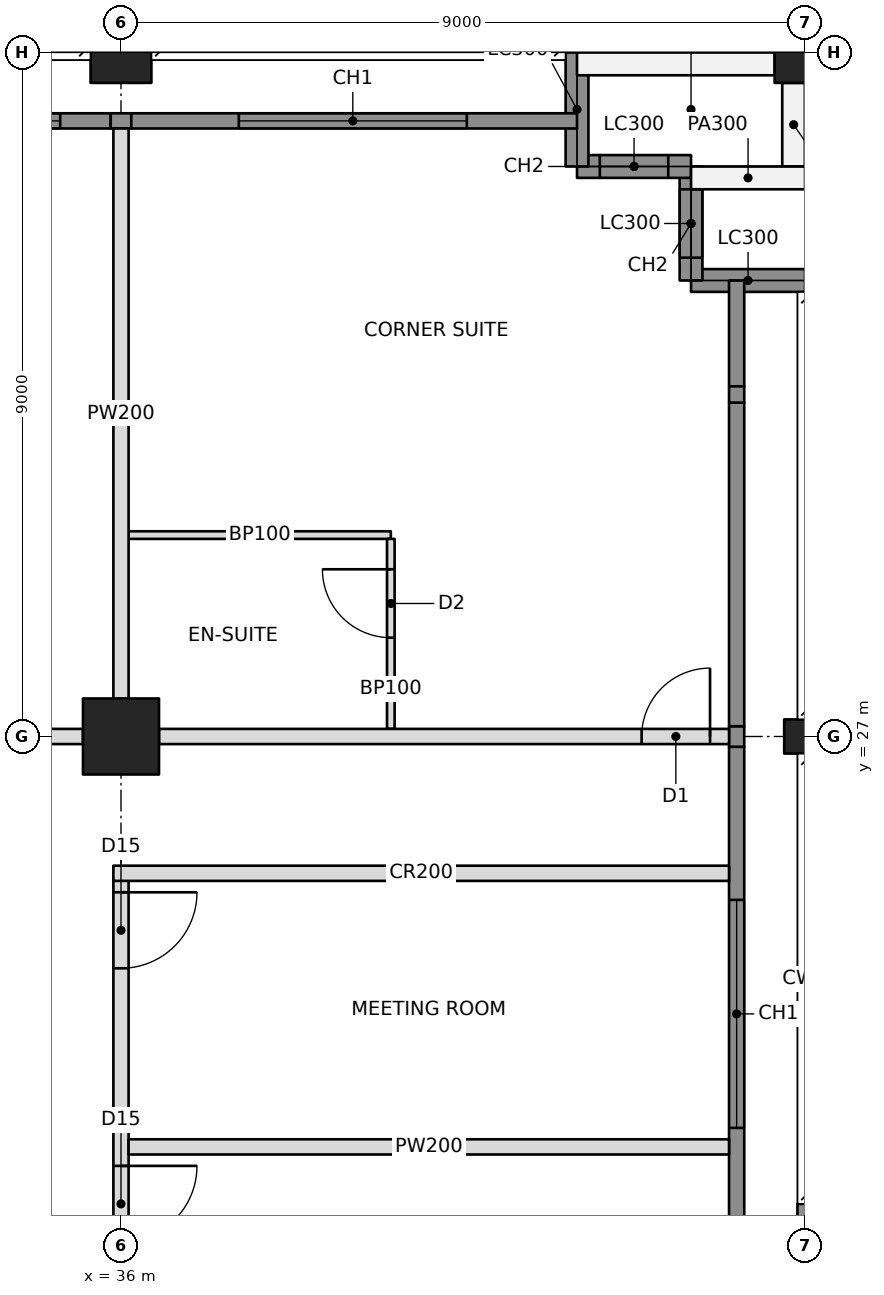
"""IFC4 building model, lengths in metres.
Left out: names, types, materials, properties, quantities, classifications, styles, units other than length and angle.
Written with IfcOpenShell. Run it as: python <this file> out.ifc"""

import sys

from ifc_helpers import new_model, si_unit, direction, frame, frame_2d, origin, origin_2d, place, context, subcontext, project, spatial, rectangle, hollow_rectangle, i_section, extrude, element, fill, save


model = new_model("IFC4")
c1 = context("Model", 3, precision=1e-05, world=origin(), true_north=direction((0.0, 1.0)))
c2 = subcontext(c1, "Body", "Model", "MODEL_VIEW")
j1 = project(units=[si_unit("LENGTHUNIT", "METRE"), si_unit("PLANEANGLEUNIT", "RADIAN")], contexts=[c1])
p1 = place(None, origin())
s1 = spatial("IfcSite", under=j1, at=p1, CompositionType="ELEMENT")
p2 = place(p1, origin())
s2 = spatial("IfcBuilding", under=s1, at=p2, CompositionType="ELEMENT")
p3 = place(p2, frame((0.0, 0.0, 94.2)))
s3 = spatial("IfcBuildingStorey", under=s2, at=p3, CompositionType="ELEMENT", Elevation=94.2)
p4 = place(p3, frame((36.0, 27.0, 0.0), z_axis=(0.0, 0.0, 1.0), x_axis=(1.0, 0.0, 0.0)))
e1 = element("IfcColumn", 1, at=p4, inside=s3, PredefinedType="COLUMN", context=c2, shape_type="SweptSolid", body=[
    extrude(hollow_rectangle(XDim=1.0, YDim=1.0, WallThickness=0.1, at=origin_2d()), origin(), (0.0, 0.0, 1.0), 3.4),
])
p5 = place(p3, frame((36.0, 36.0, 0.0), z_axis=(0.0, 0.0, 1.0), x_axis=(1.0, 0.0, 0.0)))
e2 = element("IfcColumn", 2, at=p5, inside=s3, PredefinedType="COLUMN", context=c2, shape_type="SweptSolid", body=[
    extrude(hollow_rectangle(XDim=0.8, YDim=0.8, WallThickness=0.07, at=origin_2d()), origin(), (0.0, 0.0, 1.0), 3.4),
])
p6 = place(p3, frame((45.0, 27.0, 0.0), z_axis=(0.0, 0.0, 1.0), x_axis=(0.0, 1.0, 0.0)))
e3 = element("IfcColumn", 3, at=p6, inside=s3, PredefinedType="COLUMN", context=c2, shape_type="SweptSolid", body=[
    extrude(i_section(OverallWidth=0.449, OverallDepth=0.549, WebThickness=0.072, FlangeThickness=0.115, at=origin_2d()), origin(), (0.0, 0.0, 1.0), 3.4),
])
p7 = place(p3, frame((45.0, 36.0, 0.0), z_axis=(0.0, 0.0, 1.0), x_axis=(1.0, 0.0, 0.0)))
e4 = element("IfcColumn", 4, at=p7, inside=s3, PredefinedType="COLUMN", context=c2, shape_type="SweptSolid", body=[
    extrude(hollow_rectangle(XDim=0.8, YDim=0.8, WallThickness=0.07, at=origin_2d()), origin(), (0.0, 0.0, 1.0), 3.4),
])
p8 = place(p3, frame((45.0, 33.0, 0.0), z_axis=(0.0, 0.0, 1.0), x_axis=(-1.0, 0.0, 0.0)))
e5 = element("IfcWall", 5, at=p8, inside=s3, PredefinedType="SOLIDWALL", context=c2, shape_type="SweptSolid", body=[
    extrude(rectangle(XDim=1.5, YDim=0.3, at=frame_2d((0.75, 0.0))), origin(), (0.0, 0.0, 1.0), 2.42),
])
p9 = place(p3, frame((43.5, 33.0, 0.0), z_axis=(0.0, 0.0, 1.0), x_axis=(0.0, 1.0, 0.0)))
e6 = element("IfcWall", 6, at=p9, inside=s3, PredefinedType="SOLIDWALL", context=c2, shape_type="SweptSolid", body=[
    extrude(rectangle(XDim=1.5, YDim=0.3, at=frame_2d((0.75, 0.0))), origin(), (0.0, 0.0, 1.0), 3.2),
])
p10 = place(p9, frame((0.3, 0.0, 0.6)))
e7 = element("IfcOpeningElement", 7, at=p10, cuts=e6, PredefinedType="OPENING", context=c2, shape_type="SweptSolid", body=[
    extrude(rectangle(XDim=0.9, YDim=2.2, at=frame_2d((0.45, 1.1))), frame((0.0, 0.16, 0.0), z_axis=(0.0, -1.0, 0.0), x_axis=(1.0, 0.0, 0.0)), (0.0, 0.0, 1.0), 0.32),
])
p11 = place(p3, frame((43.5, 34.5, 0.0), z_axis=(0.0, 0.0, 1.0), x_axis=(-1.0, 0.0, 0.0)))
e8 = element("IfcWall", 8, at=p11, inside=s3, PredefinedType="SOLIDWALL", context=c2, shape_type="SweptSolid", body=[
    extrude(rectangle(XDim=1.5, YDim=0.3, at=frame_2d((0.75, 0.0))), origin(), (0.0, 0.0, 1.0), 3.2),
])
p12 = place(p11, frame((0.3, 0.0, 0.6)))
e9 = element("IfcOpeningElement", 9, at=p12, cuts=e8, PredefinedType="OPENING", context=c2, shape_type="SweptSolid", body=[
    extrude(rectangle(XDim=0.9, YDim=2.2, at=frame_2d((0.45, 1.1))), frame((0.0, 0.16, 0.0), z_axis=(0.0, -1.0, 0.0), x_axis=(1.0, 0.0, 0.0)), (0.0, 0.0, 1.0), 0.32),
])
p13 = place(p3, frame((42.0, 34.5, 0.0), z_axis=(0.0, 0.0, 1.0), x_axis=(0.0, 1.0, 0.0)))
e10 = element("IfcWall", 10, at=p13, inside=s3, PredefinedType="SOLIDWALL", context=c2, shape_type="SweptSolid", body=[
    extrude(rectangle(XDim=1.5, YDim=0.3, at=frame_2d((0.75, 0.0))), origin(), (0.0, 0.0, 1.0), 2.42),
])
p14 = place(p3, frame((45.0, 20.85, 0.0), z_axis=(0.0, 0.0, 1.0), x_axis=(0.0, -1.0, 0.0)))
e11 = element("IfcWall", 11, at=p14, inside=s3, PredefinedType="SOLIDWALL", context=c2, shape_type="SweptSolid", body=[
    extrude(rectangle(XDim=2.625, YDim=0.2, at=frame_2d((1.312, 0.0))), origin(), (0.0, 0.0, 1.0), 2.42),
])
p15 = place(p14, frame((0.5, 0.0, 0.0)))
e12 = element("IfcOpeningElement", 12, at=p15, cuts=e11, PredefinedType="OPENING", context=c2, shape_type="SweptSolid", body=[
    extrude(rectangle(XDim=1.0, YDim=2.1, at=frame_2d((0.5, 1.05))), frame((0.0, 0.11, 0.0), z_axis=(0.0, -1.0, 0.0), x_axis=(1.0, 0.0, 0.0)), (0.0, 0.0, 1.0), 0.22),
])
p16 = place(p3, frame((42.0, 35.85, 0.0), z_axis=(0.0, 0.0, 1.0), x_axis=(1.0, 0.0, 0.0)))
e13 = element("IfcWall", 13, at=p16, inside=s3, PredefinedType="PARAPET", context=c2, shape_type="SweptSolid", body=[
    extrude(rectangle(XDim=2.6, YDim=0.3, at=frame_2d((1.3, 0.0))), origin(), (0.0, 0.0, 1.0), 1.1),
])
p17 = place(p3, frame((44.85, 35.6, 0.0), z_axis=(0.0, 0.0, 1.0), x_axis=(0.0, -1.0, 0.0)))
e14 = element("IfcWall", 14, at=p17, inside=s3, PredefinedType="PARAPET", context=c2, shape_type="SweptSolid", body=[
    extrude(rectangle(XDim=1.1, YDim=0.3, at=frame_2d((0.55, 0.0))), origin(), (0.0, 0.0, 1.0), 1.1),
])
p18 = place(p3, frame((43.5, 34.35, 0.0), z_axis=(0.0, 0.0, 1.0), x_axis=(1.0, 0.0, 0.0)))
e15 = element("IfcWall", 15, at=p18, inside=s3, PredefinedType="PARAPET", context=c2, shape_type="SweptSolid", body=[
    extrude(rectangle(XDim=1.5, YDim=0.3, at=frame_2d((0.75, 0.0))), origin(), (0.0, 0.0, 1.0), 1.1),
])
p19 = place(p3, frame((45.15, 34.5, 0.0), z_axis=(0.0, 0.0, 1.0), x_axis=(0.0, 1.0, 0.0)))
e16 = element("IfcWall", 16, at=p19, inside=s3, PredefinedType="PARAPET", context=c2, shape_type="SweptSolid", body=[
    extrude(rectangle(XDim=1.1, YDim=0.3, at=frame_2d((0.55, 0.0))), origin(), (0.0, 0.0, 1.0), 1.1),
])
p20 = place(p3, frame((27.5, 27.0, 0.0), z_axis=(0.0, 0.0, 1.0), x_axis=(1.0, 0.0, 0.0)))
e17 = element("IfcWall", 17, at=p20, inside=s3, PredefinedType="PARTITIONING", context=c2, shape_type="SweptSolid", body=[
    extrude(rectangle(XDim=8.0, YDim=0.2, at=frame_2d((4.0, 0.0))), origin(), (0.0, 0.0, 1.0), 2.405),
])
p21 = place(p3, frame((36.5, 27.0, 0.0), z_axis=(0.0, 0.0, 1.0), x_axis=(1.0, 0.0, 0.0)))
e18 = element("IfcWall", 18, at=p21, inside=s3, PredefinedType="PARTITIONING", context=c2, shape_type="SweptSolid", body=[
    extrude(rectangle(XDim=7.5, YDim=0.2, at=frame_2d((3.75, 0.0))), origin(), (0.0, 0.0, 1.0), 2.438),
])
p22 = place(p21, frame((6.35, 0.0, 0.0)))
e19 = element("IfcOpeningElement", 19, at=p22, cuts=e18, PredefinedType="OPENING", context=c2, shape_type="SweptSolid", body=[
    extrude(rectangle(XDim=0.9, YDim=2.1, at=frame_2d((0.45, 1.05))), frame((0.0, 0.11, 0.0), z_axis=(0.0, -1.0, 0.0), x_axis=(1.0, 0.0, 0.0)), (0.0, 0.0, 1.0), 0.22),
])
p23 = place(p3, frame((36.0, 18.5, 0.0), z_axis=(0.0, 0.0, 1.0), x_axis=(0.0, 1.0, 0.0)))
e20 = element("IfcWall", 20, at=p23, inside=s3, PredefinedType="PARTITIONING", context=c2, shape_type="SweptSolid", body=[
    extrude(rectangle(XDim=6.7, YDim=0.2, at=frame_2d((3.35, 0.0))), origin(), (0.0, 0.0, 1.0), 2.405),
])
p24 = place(p23, frame((5.45, 0.0, 0.0)))
e21 = element("IfcOpeningElement", 21, at=p24, cuts=e20, PredefinedType="OPENING", context=c2, shape_type="SweptSolid", body=[
    extrude(rectangle(XDim=1.0, YDim=2.1, at=frame_2d((0.5, 1.05))), frame((0.0, 0.11, 0.0), z_axis=(0.0, -1.0, 0.0), x_axis=(1.0, 0.0, 0.0)), (0.0, 0.0, 1.0), 0.22),
])
p25 = place(p23, frame((1.85, 0.0, 0.0)))
e22 = element("IfcOpeningElement", 22, at=p25, cuts=e20, PredefinedType="OPENING", context=c2, shape_type="SweptSolid", body=[
    extrude(rectangle(XDim=1.0, YDim=2.1, at=frame_2d((0.5, 1.05))), frame((0.0, 0.11, 0.0), z_axis=(0.0, -1.0, 0.0), x_axis=(1.0, 0.0, 0.0)), (0.0, 0.0, 1.0), 0.22),
])
p26 = place(p3, frame((35.9, 25.2, 0.0), z_axis=(0.0, 0.0, 1.0), x_axis=(1.0, 0.0, 0.0)))
e23 = element("IfcWall", 23, at=p26, inside=s3, PredefinedType="PARTITIONING", context=c2, shape_type="SweptSolid", body=[
    extrude(rectangle(XDim=8.1, YDim=0.2, at=frame_2d((4.05, 0.0))), origin(), (0.0, 0.0, 1.0), 2.404),
])
p27 = place(p3, frame((36.0, 27.5, 0.0), z_axis=(0.0, 0.0, 1.0), x_axis=(0.0, 1.0, 0.0)))
e24 = element("IfcWall", 24, at=p27, inside=s3, PredefinedType="PARTITIONING", context=c2, shape_type="SweptSolid", body=[
    extrude(rectangle(XDim=7.5, YDim=0.2, at=frame_2d((3.75, 0.0))), origin(), (0.0, 0.0, 1.0), 2.438),
])
p28 = place(p3, frame((36.1, 29.65, 0.0), z_axis=(0.0, 0.0, 1.0), x_axis=(1.0, 0.0, 0.0)))
e25 = element("IfcWall", 25, at=p28, inside=s3, PredefinedType="PARTITIONING", context=c2, shape_type="SweptSolid", body=[
    extrude(rectangle(XDim=3.45, YDim=0.1, at=frame_2d((1.725, 0.0))), origin(), (0.0, 0.0, 1.0), 2.438),
])
p29 = place(p3, frame((39.55, 27.1, 0.0), z_axis=(0.0, 0.0, 1.0), x_axis=(0.0, 1.0, 0.0)))
e26 = element("IfcWall", 26, at=p29, inside=s3, PredefinedType="PARTITIONING", context=c2, shape_type="SweptSolid", body=[
    extrude(rectangle(XDim=2.5, YDim=0.1, at=frame_2d((1.25, 0.0))), origin(), (0.0, 0.0, 1.0), 2.438),
])
p30 = place(p29, frame((1.2, 0.0, 0.0)))
e27 = element("IfcOpeningElement", 27, at=p30, cuts=e26, PredefinedType="OPENING", context=c2, shape_type="SweptSolid", body=[
    extrude(rectangle(XDim=0.9, YDim=2.1, at=frame_2d((0.45, 1.05))), frame((0.0, 0.06, 0.0), z_axis=(0.0, -1.0, 0.0), x_axis=(1.0, 0.0, 0.0)), (0.0, 0.0, 1.0), 0.12),
])
p31 = place(p3, frame((36.1, 21.6, 0.0), z_axis=(0.0, 0.0, 1.0), x_axis=(1.0, 0.0, 0.0)))
e28 = element("IfcWall", 28, at=p31, inside=s3, PredefinedType="PARTITIONING", context=c2, shape_type="SweptSolid", body=[
    extrude(rectangle(XDim=7.9, YDim=0.2, at=frame_2d((3.95, 0.0))), origin(), (0.0, 0.0, 1.0), 2.404),
])
p32 = place(p3, frame((27.194, 35.1, 0.0), z_axis=(0.0, 0.0, 1.0), x_axis=(1.0, 0.0, 0.0)))
e29 = element("IfcWall", 29, at=p32, inside=s3, PredefinedType="SOLIDWALL", context=c2, shape_type="SweptSolid", body=[
    extrude(rectangle(XDim=8.671, YDim=0.2, at=frame_2d((4.335, 0.0))), origin(), (0.0, 0.0, 1.0), 3.2),
])
p33 = place(p32, frame((0.606, 0.0, 0.6)))
e30 = element("IfcOpeningElement", 30, at=p33, cuts=e29, PredefinedType="OPENING", context=c2, shape_type="SweptSolid", body=[
    extrude(rectangle(XDim=3.0, YDim=2.2, at=frame_2d((1.5, 1.1))), frame((0.0, 0.11, 0.0), z_axis=(0.0, -1.0, 0.0), x_axis=(1.0, 0.0, 0.0)), (0.0, 0.0, 1.0), 0.22),
])
p34 = place(p32, frame((5.006, 0.0, 0.6)))
e31 = element("IfcOpeningElement", 31, at=p34, cuts=e29, PredefinedType="OPENING", context=c2, shape_type="SweptSolid", body=[
    extrude(rectangle(XDim=3.0, YDim=2.2, at=frame_2d((1.5, 1.1))), frame((0.0, 0.11, 0.0), z_axis=(0.0, -1.0, 0.0), x_axis=(1.0, 0.0, 0.0)), (0.0, 0.0, 1.0), 0.22),
])
p35 = place(p3, frame((35.865, 35.1, 0.0), z_axis=(0.0, 0.0, 1.0), x_axis=(1.0, 0.0, 0.0)))
e32 = element("IfcWall", 32, at=p35, inside=s3, PredefinedType="SOLIDWALL", context=c2, shape_type="SweptSolid", body=[
    extrude(rectangle(XDim=0.271, YDim=0.2, at=frame_2d((0.135, 0.0))), origin(), (0.0, 0.0, 1.0), 2.438),
])
p36 = place(p3, frame((36.135, 35.1, 0.0), z_axis=(0.0, 0.0, 1.0), x_axis=(1.0, 0.0, 0.0)))
e33 = element("IfcWall", 33, at=p36, inside=s3, PredefinedType="SOLIDWALL", context=c2, shape_type="SweptSolid", body=[
    extrude(rectangle(XDim=5.865, YDim=0.2, at=frame_2d((2.932, 0.0))), origin(), (0.0, 0.0, 1.0), 3.2),
])
p37 = place(p36, frame((1.415, 0.0, 0.6)))
e34 = element("IfcOpeningElement", 34, at=p37, cuts=e33, PredefinedType="OPENING", context=c2, shape_type="SweptSolid", body=[
    extrude(rectangle(XDim=3.0, YDim=2.2, at=frame_2d((1.5, 1.1))), frame((0.0, 0.11, 0.0), z_axis=(0.0, -1.0, 0.0), x_axis=(1.0, 0.0, 0.0)), (0.0, 0.0, 1.0), 0.22),
])
p38 = place(p3, frame((44.1, 18.194, 0.0), z_axis=(0.0, 0.0, 1.0), x_axis=(0.0, 1.0, 0.0)))
e35 = element("IfcWall", 35, at=p38, inside=s3, PredefinedType="SOLIDWALL", context=c2, shape_type="SweptSolid", body=[
    extrude(rectangle(XDim=8.671, YDim=0.2, at=frame_2d((4.335, 0.0))), origin(), (0.0, 0.0, 1.0), 3.2),
])
p39 = place(p38, frame((3.656, 0.0, 0.6)))
e36 = element("IfcOpeningElement", 36, at=p39, cuts=e35, PredefinedType="OPENING", context=c2, shape_type="SweptSolid", body=[
    extrude(rectangle(XDim=3.0, YDim=2.2, at=frame_2d((1.5, 1.1))), frame((0.0, 0.11, 0.0), z_axis=(0.0, -1.0, 0.0), x_axis=(1.0, 0.0, 0.0)), (0.0, 0.0, 1.0), 0.22),
])
p40 = place(p38, frame((1.156, 0.0, 0.0)))
e37 = element("IfcOpeningElement", 37, at=p40, cuts=e35, PredefinedType="OPENING", context=c2, shape_type="SweptSolid", body=[
    extrude(rectangle(XDim=1.0, YDim=2.1, at=frame_2d((0.5, 1.05))), frame((0.0, 0.11, 0.0), z_axis=(0.0, -1.0, 0.0), x_axis=(1.0, 0.0, 0.0)), (0.0, 0.0, 1.0), 0.22),
])
p41 = place(p3, frame((44.1, 26.865, 0.0), z_axis=(0.0, 0.0, 1.0), x_axis=(0.0, 1.0, 0.0)))
e38 = element("IfcWall", 38, at=p41, inside=s3, PredefinedType="SOLIDWALL", context=c2, shape_type="SweptSolid", body=[
    extrude(rectangle(XDim=0.271, YDim=0.2, at=frame_2d((0.135, 0.0))), origin(), (0.0, 0.0, 1.0), 2.438),
])
p42 = place(p3, frame((44.1, 27.135, 0.0), z_axis=(0.0, 0.0, 1.0), x_axis=(0.0, 1.0, 0.0)))
e39 = element("IfcWall", 39, at=p42, inside=s3, PredefinedType="SOLIDWALL", context=c2, shape_type="SweptSolid", body=[
    extrude(rectangle(XDim=4.257, YDim=0.2, at=frame_2d((2.129, 0.0))), origin(), (0.0, 0.0, 1.0), 3.2),
])
p43 = place(p3, frame((44.1, 31.393, 0.0), z_axis=(0.0, 0.0, 1.0), x_axis=(0.0, 1.0, 0.0)))
e40 = element("IfcWall", 40, at=p43, inside=s3, PredefinedType="SOLIDWALL", context=c2, shape_type="SweptSolid", body=[
    extrude(rectangle(XDim=0.215, YDim=0.2, at=frame_2d((0.107, 0.0))), origin(), (0.0, 0.0, 1.0), 2.661),
])
p44 = place(p3, frame((44.1, 31.607, 0.0), z_axis=(0.0, 0.0, 1.0), x_axis=(0.0, 1.0, 0.0)))
e41 = element("IfcWall", 41, at=p44, inside=s3, PredefinedType="SOLIDWALL", context=c2, shape_type="SweptSolid", body=[
    extrude(rectangle(XDim=1.393, YDim=0.2, at=frame_2d((0.696, 0.0))), origin(), (0.0, 0.0, 1.0), 3.2),
])
p45 = place(p10, origin())
e42 = element("IfcWindow", 42, at=p45, inside=s3, PartitioningType="SINGLE_PANEL", PredefinedType="WINDOW", context=c2, shape_type="SweptSolid", body=[
    extrude(rectangle(XDim=0.9, YDim=2.2, at=frame_2d((0.45, 1.1))), frame((0.0, 0.03, 0.0), z_axis=(0.0, -1.0, 0.0), x_axis=(1.0, 0.0, 0.0)), (0.0, 0.0, 1.0), 0.06),
])
fill(e7, e42)
p46 = place(p12, origin())
e43 = element("IfcWindow", 43, at=p46, inside=s3, PartitioningType="SINGLE_PANEL", PredefinedType="WINDOW", context=c2, shape_type="SweptSolid", body=[
    extrude(rectangle(XDim=0.9, YDim=2.2, at=frame_2d((0.45, 1.1))), frame((0.0, 0.03, 0.0), z_axis=(0.0, -1.0, 0.0), x_axis=(1.0, 0.0, 0.0)), (0.0, 0.0, 1.0), 0.06),
])
fill(e9, e43)
p47 = place(p34, origin())
e44 = element("IfcWindow", 44, at=p47, inside=s3, PartitioningType="TRIPLE_PANEL_VERTICAL", PredefinedType="WINDOW", context=c2, shape_type="SweptSolid", body=[
    extrude(rectangle(XDim=3.0, YDim=2.2, at=frame_2d((1.5, 1.1))), frame((0.0, 0.03, 0.0), z_axis=(0.0, -1.0, 0.0), x_axis=(1.0, 0.0, 0.0)), (0.0, 0.0, 1.0), 0.06),
])
fill(e31, e44)
p48 = place(p37, origin())
e45 = element("IfcWindow", 45, at=p48, inside=s3, PartitioningType="TRIPLE_PANEL_VERTICAL", PredefinedType="WINDOW", context=c2, shape_type="SweptSolid", body=[
    extrude(rectangle(XDim=3.0, YDim=2.2, at=frame_2d((1.5, 1.1))), frame((0.0, 0.03, 0.0), z_axis=(0.0, -1.0, 0.0), x_axis=(1.0, 0.0, 0.0)), (0.0, 0.0, 1.0), 0.06),
])
fill(e34, e45)
p49 = place(p39, origin())
e46 = element("IfcWindow", 46, at=p49, inside=s3, PartitioningType="TRIPLE_PANEL_VERTICAL", PredefinedType="WINDOW", context=c2, shape_type="SweptSolid", body=[
    extrude(rectangle(XDim=3.0, YDim=2.2, at=frame_2d((1.5, 1.1))), frame((0.0, 0.03, 0.0), z_axis=(0.0, -1.0, 0.0), x_axis=(1.0, 0.0, 0.0)), (0.0, 0.0, 1.0), 0.06),
])
fill(e36, e46)
p50 = place(p30, origin())
e47 = element("IfcDoor", 47, at=p50, inside=s3, OperationType="SINGLE_SWING_RIGHT", PredefinedType="DOOR", context=c2, shape_type="SweptSolid", body=[
    extrude(rectangle(XDim=0.9, YDim=2.1, at=frame_2d((0.45, 1.05))), frame((0.0, 0.025, 0.0), z_axis=(0.0, -1.0, 0.0), x_axis=(1.0, 0.0, 0.0)), (0.0, 0.0, 1.0), 0.05),
])
fill(e27, e47)
p51 = place(p22, origin())
e48 = element("IfcDoor", 48, at=p51, inside=s3, OperationType="SINGLE_SWING_RIGHT", PredefinedType="DOOR", context=c2, shape_type="SweptSolid", body=[
    extrude(rectangle(XDim=0.9, YDim=2.1, at=frame_2d((0.45, 1.05))), frame((0.0, 0.025, 0.0), z_axis=(0.0, -1.0, 0.0), x_axis=(1.0, 0.0, 0.0)), (0.0, 0.0, 1.0), 0.05),
])
fill(e19, e48)
p52 = place(p24, frame((1.0, 0.0, 0.0), z_axis=(0.0, 0.0, 1.0), x_axis=(-1.0, 0.0, 0.0)))
e49 = element("IfcDoor", 49, at=p52, inside=s3, OperationType="SINGLE_SWING_LEFT", PredefinedType="DOOR", context=c2, shape_type="SweptSolid", body=[
    extrude(rectangle(XDim=1.0, YDim=2.1, at=frame_2d((0.5, 1.05))), frame((0.0, 0.025, 0.0), z_axis=(0.0, -1.0, 0.0), x_axis=(1.0, 0.0, 0.0)), (0.0, 0.0, 1.0), 0.05),
])
fill(e21, e49)
p53 = place(p25, frame((1.0, 0.0, 0.0), z_axis=(0.0, 0.0, 1.0), x_axis=(-1.0, 0.0, 0.0)))
e50 = element("IfcDoor", 50, at=p53, inside=s3, OperationType="SINGLE_SWING_LEFT", PredefinedType="DOOR", context=c2, shape_type="SweptSolid", body=[
    extrude(rectangle(XDim=1.0, YDim=2.1, at=frame_2d((0.5, 1.05))), frame((0.0, 0.025, 0.0), z_axis=(0.0, -1.0, 0.0), x_axis=(1.0, 0.0, 0.0)), (0.0, 0.0, 1.0), 0.05),
])
fill(e22, e50)
save(model, sys.argv[1])
